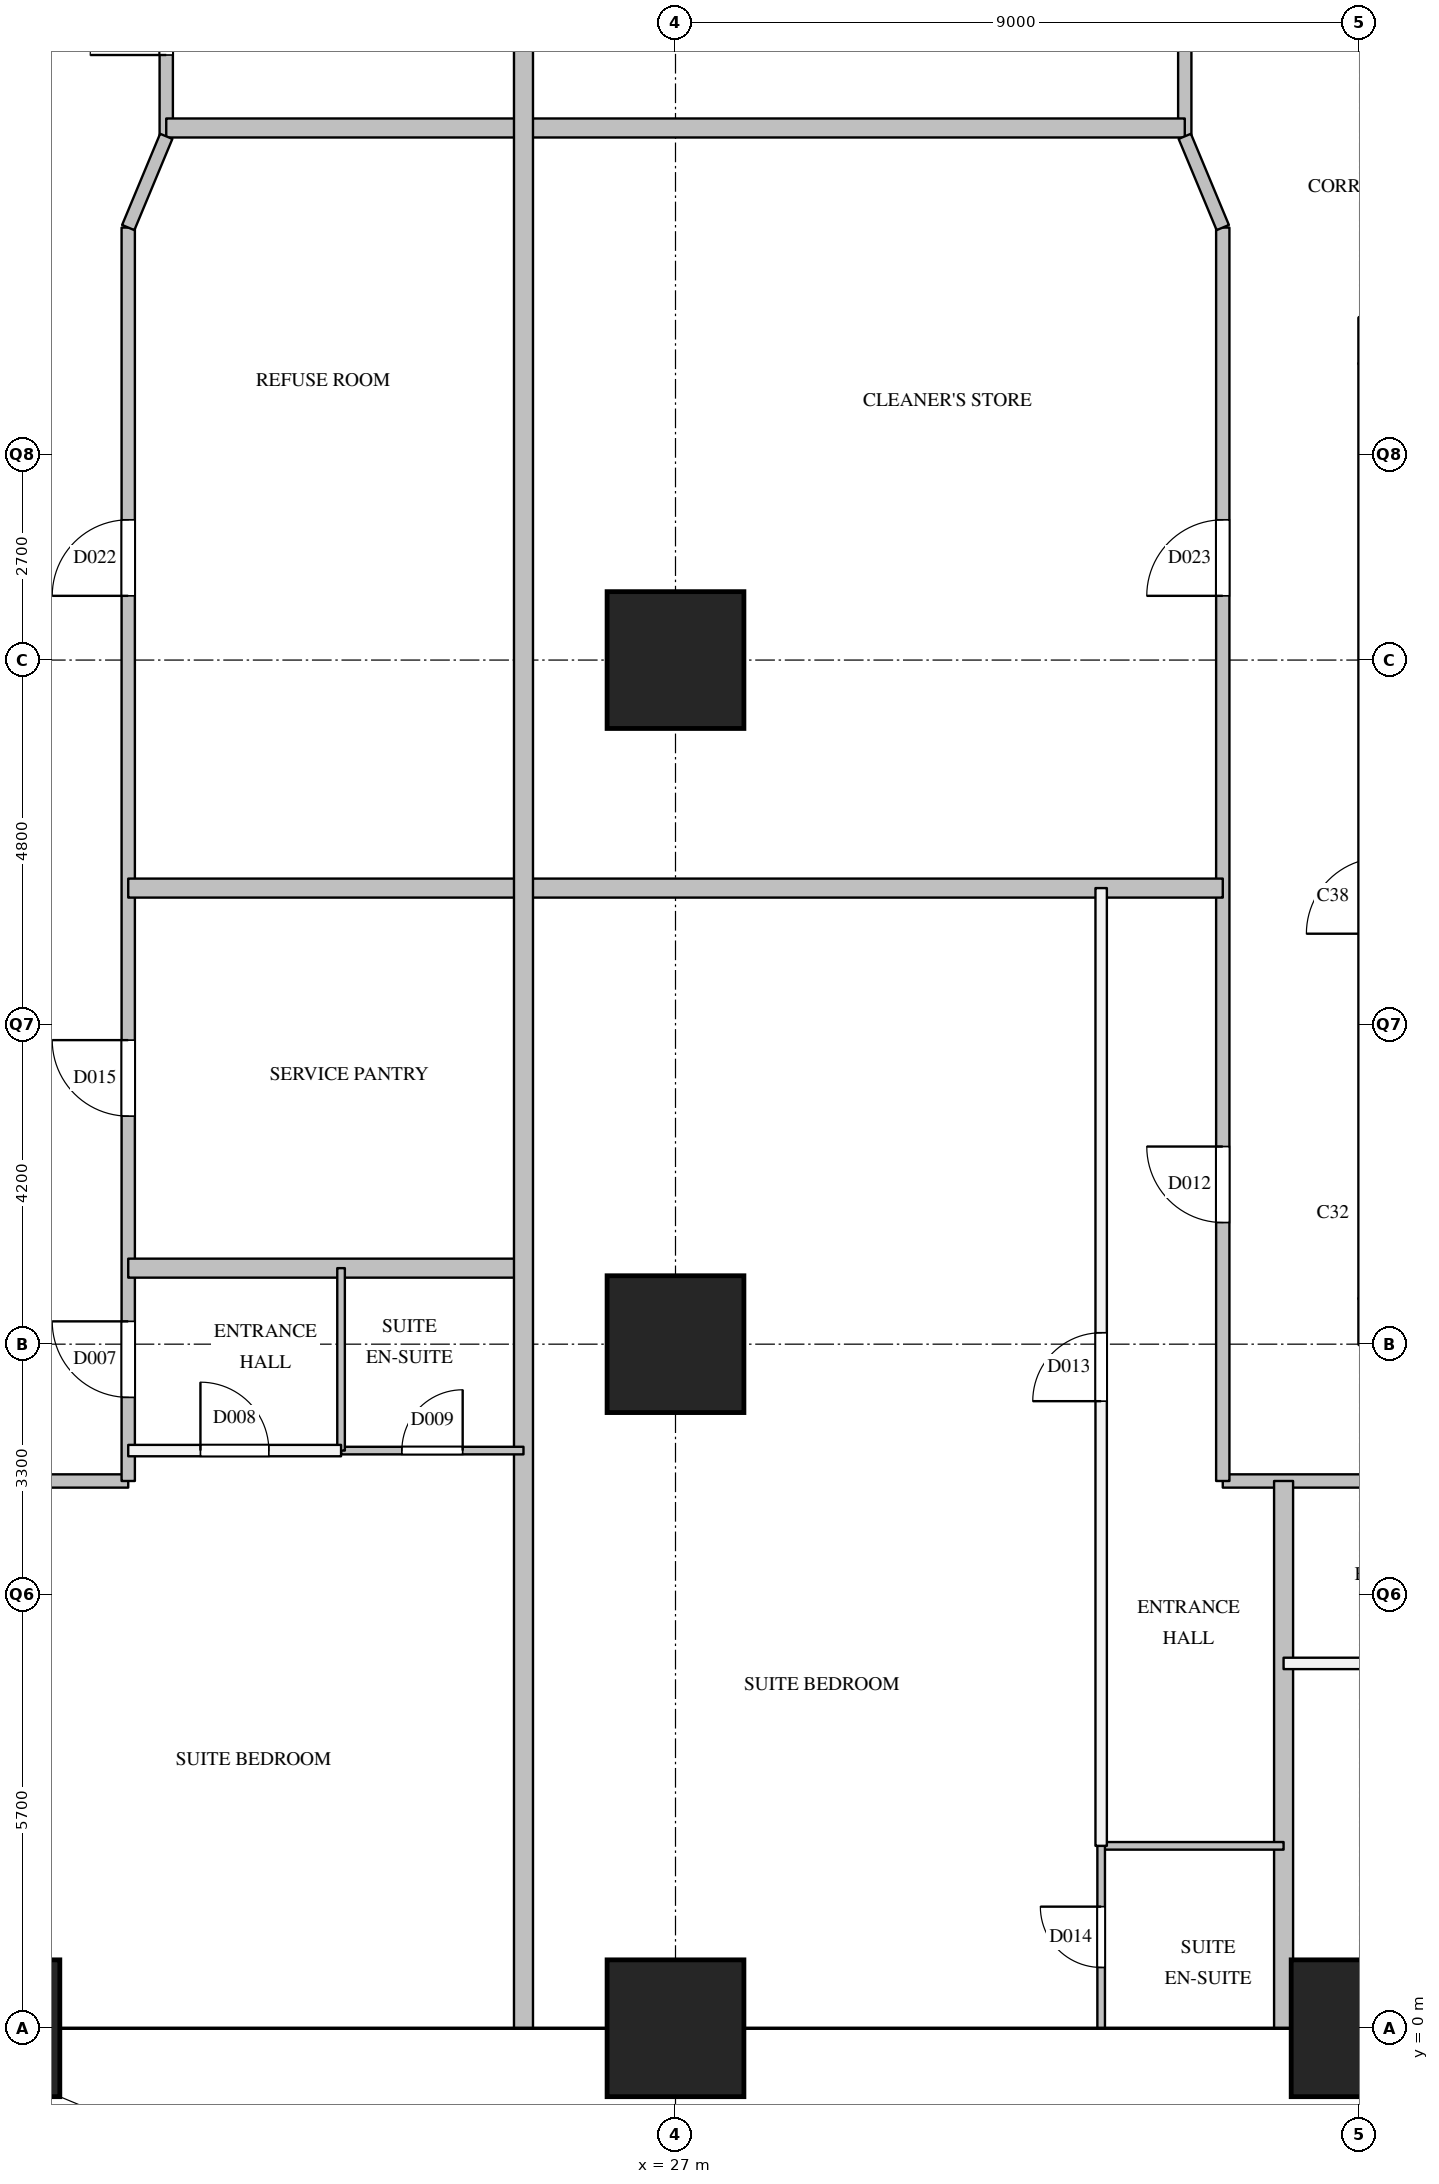
"""IFC4 building model, lengths in metres.
Left out: names, types, materials, properties, quantities, classifications, styles, units other than length and angle.
Written with IfcOpenShell. Run it as: python <this file> out.ifc"""

import sys

from ifc_helpers import new_model, si_unit, direction, frame, frame_2d, origin, origin_2d, place, context, subcontext, project, spatial, rectangle, extrude, element, fill, save


model = new_model("IFC4")
c1 = context("Model", 3, precision=1e-05, world=origin(), true_north=direction((0.0, 1.0)))
c2 = subcontext(c1, "Body", "Model", "MODEL_VIEW")
j1 = project(units=[si_unit("LENGTHUNIT", "METRE"), si_unit("PLANEANGLEUNIT", "RADIAN")], contexts=[c1])
p1 = place(None, origin())
s1 = spatial("IfcSite", under=j1, at=p1, CompositionType="ELEMENT")
p2 = place(p1, origin())
s2 = spatial("IfcBuilding", under=s1, at=p2, CompositionType="ELEMENT")
p3 = place(p2, frame((0.0, 0.0, 72.8)))
s3 = spatial("IfcBuildingStorey", under=s2, at=p3, CompositionType="ELEMENT", Elevation=72.8)
for number, where, z_axis, x_axis in (
    (1, (18.0, 0.0, 0.0), (0.0, 0.0, 1.0), (1.0, 0.0, 0.0)),
    (2, (27.0, 0.0, 0.0), (0.0, 0.0, 1.0), (1.0, 0.0, 0.0)),
    (3, (27.0, 9.0, 0.0), (0.0, 0.0, 1.0), (1.0, 0.0, 0.0)),
    (4, (27.0, 18.0, 0.0), (0.0, 0.0, 1.0), (1.0, 0.0, 0.0)),
    (5, (36.0, 0.0, 0.0), (0.0, 0.0, 1.0), (1.0, 0.0, 0.0)),
):
    element("IfcColumn", number, at=place(p3, frame(where, z_axis=z_axis, x_axis=x_axis)), inside=s3, PredefinedType="COLUMN", context=c2, shape_type="SweptSolid", body=[
        extrude(rectangle(XDim=1.8, YDim=1.8, at=origin_2d()), origin(), (0.0, 0.0, 1.0), 5.0),
    ])
p4 = place(p3, frame((7.2, 7.2, 0.0), z_axis=(0.0, 0.0, 1.0), x_axis=(1.0, 0.0, 0.0)))
e6 = element("IfcWall", 6, at=p4, inside=s3, PredefinedType="PARTITIONING", context=c2, shape_type="SweptSolid", body=[
    extrude(rectangle(XDim=12.6, YDim=0.175, at=frame_2d((6.3, 0.0))), origin(), (0.0, 0.0, 1.0), 4.7),
])
p5 = place(p4, frame((3.6, 0.0, 0.0)))
e7 = element("IfcOpeningElement", 7, at=p5, cuts=e6, PredefinedType="OPENING", context=c2, shape_type="SweptSolid", body=[
    extrude(rectangle(XDim=1.0, YDim=2.1, at=frame_2d((0.5, 1.05))), frame((0.0, 0.097, 0.0), z_axis=(0.0, -1.0, 0.0), x_axis=(1.0, 0.0, 0.0)), (0.0, 0.0, 1.0), 0.195),
])
p6 = place(p4, frame((0.95, 0.0, 0.0)))
e8 = element("IfcOpeningElement", 8, at=p6, cuts=e6, PredefinedType="OPENING", context=c2, shape_type="SweptSolid", body=[
    extrude(rectangle(XDim=0.9, YDim=2.1, at=frame_2d((0.45, 1.05))), frame((0.0, 0.097, 0.0), z_axis=(0.0, -1.0, 0.0), x_axis=(1.0, 0.0, 0.0)), (0.0, 0.0, 1.0), 0.195),
])
p7 = place(p3, frame((34.2, 7.2, 0.0), z_axis=(0.0, 0.0, 1.0), x_axis=(1.0, 0.0, 0.0)))
e9 = element("IfcWall", 9, at=p7, inside=s3, PredefinedType="PARTITIONING", context=c2, shape_type="SweptSolid", body=[
    extrude(rectangle(XDim=12.6, YDim=0.175, at=frame_2d((6.3, 0.0))), origin(), (0.0, 0.0, 1.0), 4.7),
])
p8 = place(p7, frame((4.1, 0.0, 0.0)))
e10 = element("IfcOpeningElement", 10, at=p8, cuts=e9, PredefinedType="OPENING", context=c2, shape_type="SweptSolid", body=[
    extrude(rectangle(XDim=1.0, YDim=2.1, at=frame_2d((0.5, 1.05))), frame((0.0, 0.097, 0.0), z_axis=(0.0, -1.0, 0.0), x_axis=(1.0, 0.0, 0.0)), (0.0, 0.0, 1.0), 0.195),
])
p9 = place(p3, frame((19.8, 7.2, 0.0), z_axis=(0.0, 0.0, 1.0), x_axis=(0.0, 1.0, 0.0)))
e11 = element("IfcWall", 11, at=p9, inside=s3, PredefinedType="PARTITIONING", context=c2, shape_type="SweptSolid", body=[
    extrude(rectangle(XDim=16.49, YDim=0.175, at=frame_2d((8.245, 0.0))), origin(), (0.0, 0.0, 1.0), 4.7),
])
p10 = place(p9, frame((1.1, 0.0, 0.0)))
e12 = element("IfcOpeningElement", 12, at=p10, cuts=e11, PredefinedType="OPENING", context=c2, shape_type="SweptSolid", body=[
    extrude(rectangle(XDim=1.0, YDim=2.1, at=frame_2d((0.5, 1.05))), frame((0.0, 0.097, 0.0), z_axis=(0.0, -1.0, 0.0), x_axis=(1.0, 0.0, 0.0)), (0.0, 0.0, 1.0), 0.195),
])
p11 = place(p9, frame((4.8, 0.0, 0.0)))
e13 = element("IfcOpeningElement", 13, at=p11, cuts=e11, PredefinedType="OPENING", context=c2, shape_type="SweptSolid", body=[
    extrude(rectangle(XDim=1.0, YDim=2.1, at=frame_2d((0.5, 1.05))), frame((0.0, 0.097, 0.0), z_axis=(0.0, -1.0, 0.0), x_axis=(1.0, 0.0, 0.0)), (0.0, 0.0, 1.0), 0.195),
])
p12 = place(p9, frame((11.645, 0.0, 0.0)))
e14 = element("IfcOpeningElement", 14, at=p12, cuts=e11, PredefinedType="OPENING", context=c2, shape_type="SweptSolid", body=[
    extrude(rectangle(XDim=1.0, YDim=2.1, at=frame_2d((0.5, 1.05))), frame((0.0, 0.097, 0.0), z_axis=(0.0, -1.0, 0.0), x_axis=(1.0, 0.0, 0.0)), (0.0, 0.0, 1.0), 0.195),
])
p13 = place(p3, frame((20.3, 24.89, 0.0), z_axis=(0.0, 0.0, 1.0), x_axis=(0.0, 1.0, 0.0)))
e15 = element("IfcWall", 15, at=p13, inside=s3, PredefinedType="PARTITIONING", context=c2, shape_type="SweptSolid", body=[
    extrude(rectangle(XDim=3.03, YDim=0.175, at=frame_2d((1.515, 0.0))), origin(), (0.0, 0.0, 1.0), 3.59),
])
p14 = place(p13, frame((1.07, 0.0, 0.0)))
e16 = element("IfcOpeningElement", 16, at=p14, cuts=e15, PredefinedType="OPENING", context=c2, shape_type="SweptSolid", body=[
    extrude(rectangle(XDim=1.0, YDim=2.1, at=frame_2d((0.5, 1.05))), frame((0.0, 0.097, 0.0), z_axis=(0.0, -1.0, 0.0), x_axis=(1.0, 0.0, 0.0)), (0.0, 0.0, 1.0), 0.195),
])
p15 = place(p3, frame((33.7, 24.89, 0.0), z_axis=(0.0, 0.0, 1.0), x_axis=(0.0, 1.0, 0.0)))
e17 = element("IfcWall", 17, at=p15, inside=s3, PredefinedType="PARTITIONING", context=c2, shape_type="SweptSolid", body=[
    extrude(rectangle(XDim=3.03, YDim=0.175, at=frame_2d((1.515, 0.0))), origin(), (0.0, 0.0, 1.0), 3.7),
])
p16 = place(p3, frame((34.2, 7.2, 0.0), z_axis=(0.0, 0.0, 1.0), x_axis=(0.0, 1.0, 0.0)))
e18 = element("IfcWall", 18, at=p16, inside=s3, PredefinedType="PARTITIONING", context=c2, shape_type="SweptSolid", body=[
    extrude(rectangle(XDim=16.49, YDim=0.175, at=frame_2d((8.245, 0.0))), origin(), (0.0, 0.0, 1.0), 4.7),
])
p17 = place(p16, frame((3.4, 0.0, 0.0)))
e19 = element("IfcOpeningElement", 19, at=p17, cuts=e18, PredefinedType="OPENING", context=c2, shape_type="SweptSolid", body=[
    extrude(rectangle(XDim=1.0, YDim=2.1, at=frame_2d((0.5, 1.05))), frame((0.0, 0.097, 0.0), z_axis=(0.0, -1.0, 0.0), x_axis=(1.0, 0.0, 0.0)), (0.0, 0.0, 1.0), 0.195),
])
p18 = place(p16, frame((11.645, 0.0, 0.0)))
e20 = element("IfcOpeningElement", 20, at=p18, cuts=e18, PredefinedType="OPENING", context=c2, shape_type="SweptSolid", body=[
    extrude(rectangle(XDim=1.0, YDim=2.1, at=frame_2d((0.5, 1.05))), frame((0.0, 0.097, 0.0), z_axis=(0.0, -1.0, 0.0), x_axis=(1.0, 0.0, 0.0)), (0.0, 0.0, 1.0), 0.195),
])
p19 = place(p3, frame((35.0, 4.8, 0.0), z_axis=(0.0, 0.0, 1.0), x_axis=(1.0, 0.0, 0.0)))
e21 = element("IfcWall", 21, at=p19, inside=s3, PredefinedType="PARTITIONING", context=c2, shape_type="SweptSolid", body=[
    extrude(rectangle(XDim=7.6, YDim=0.15, at=frame_2d((3.8, 0.0))), origin(), (0.0, 0.0, 1.0), 4.7),
])
p20 = place(p19, frame((3.35, 0.0, 0.0)))
e22 = element("IfcOpeningElement", 22, at=p20, cuts=e21, PredefinedType="OPENING", context=c2, shape_type="SweptSolid", body=[
    extrude(rectangle(XDim=0.9, YDim=2.1, at=frame_2d((0.45, 1.05))), frame((0.0, 0.085, 0.0), z_axis=(0.0, -1.0, 0.0), x_axis=(1.0, 0.0, 0.0)), (0.0, 0.0, 1.0), 0.17),
])
p21 = place(p3, frame((19.8, 7.6, 0.0), z_axis=(0.0, 0.0, 1.0), x_axis=(1.0, 0.0, 0.0)))
e23 = element("IfcWall", 23, at=p21, inside=s3, PredefinedType="PARTITIONING", context=c2, shape_type="SweptSolid", body=[
    extrude(rectangle(XDim=2.8, YDim=0.15, at=frame_2d((1.4, 0.0))), origin(), (0.0, 0.0, 1.0), 4.7),
])
p22 = place(p21, frame((0.95, 0.0, 0.0)))
e24 = element("IfcOpeningElement", 24, at=p22, cuts=e23, PredefinedType="OPENING", context=c2, shape_type="SweptSolid", body=[
    extrude(rectangle(XDim=0.9, YDim=2.1, at=frame_2d((0.45, 1.05))), frame((0.0, 0.085, 0.0), z_axis=(0.0, -1.0, 0.0), x_axis=(1.0, 0.0, 0.0)), (0.0, 0.0, 1.0), 0.17),
])
p23 = place(p3, frame((32.6, 2.4, 0.0), z_axis=(0.0, 0.0, 1.0), x_axis=(0.0, 1.0, 0.0)))
e25 = element("IfcWall", 25, at=p23, inside=s3, PredefinedType="PARTITIONING", context=c2, shape_type="SweptSolid", body=[
    extrude(rectangle(XDim=12.6, YDim=0.15, at=frame_2d((6.3, 0.0))), origin(), (0.0, 0.0, 1.0), 4.7),
])
p24 = place(p23, frame((5.85, 0.0, 0.0)))
e26 = element("IfcOpeningElement", 26, at=p24, cuts=e25, PredefinedType="OPENING", context=c2, shape_type="SweptSolid", body=[
    extrude(rectangle(XDim=0.9, YDim=2.1, at=frame_2d((0.45, 1.05))), frame((0.0, 0.085, 0.0), z_axis=(0.0, -1.0, 0.0), x_axis=(1.0, 0.0, 0.0)), (0.0, 0.0, 1.0), 0.17),
])
p25 = place(p3, frame((19.8, 10.0, 0.0), z_axis=(0.0, 0.0, 1.0), x_axis=(1.0, 0.0, 0.0)))
e27 = element("IfcWall", 27, at=p25, inside=s3, PredefinedType="PARTITIONING", context=c2, shape_type="SweptSolid", body=[
    extrude(rectangle(XDim=5.2, YDim=0.25, at=frame_2d((2.6, 0.0))), origin(), (0.0, 0.0, 1.0), 4.7),
])
p26 = place(p3, frame((19.8, 15.0, 0.0), z_axis=(0.0, 0.0, 1.0), x_axis=(1.0, 0.0, 0.0)))
e28 = element("IfcWall", 28, at=p26, inside=s3, PredefinedType="PARTITIONING", context=c2, shape_type="SweptSolid", body=[
    extrude(rectangle(XDim=14.4, YDim=0.25, at=frame_2d((7.2, 0.0))), origin(), (0.0, 0.0, 1.0), 3.59),
])
p27 = place(p3, frame((20.3, 25.0, 0.0), z_axis=(0.0, 0.0, 1.0), x_axis=(1.0, 0.0, 0.0)))
e29 = element("IfcWall", 29, at=p27, inside=s3, PredefinedType="PARTITIONING", context=c2, shape_type="SweptSolid", body=[
    extrude(rectangle(XDim=13.4, YDim=0.25, at=frame_2d((6.7, 0.0))), origin(), (0.0, 0.0, 1.0), 3.59),
])
p28 = place(p3, frame((25.0, 0.0, 0.0), z_axis=(0.0, 0.0, 1.0), x_axis=(0.0, 1.0, 0.0)))
e30 = element("IfcWall", 30, at=p28, inside=s3, PredefinedType="PARTITIONING", context=c2, shape_type="SweptSolid", body=[
    extrude(rectangle(XDim=35.0, YDim=0.25, at=frame_2d((17.5, 0.0))), origin(), (0.0, 0.0, 1.0), 3.59),
])
p29 = place(p3, frame((35.0, 0.0, 0.0), z_axis=(0.0, 0.0, 1.0), x_axis=(0.0, 1.0, 0.0)))
e31 = element("IfcWall", 31, at=p29, inside=s3, PredefinedType="PARTITIONING", context=c2, shape_type="SweptSolid", body=[
    extrude(rectangle(XDim=7.2, YDim=0.25, at=frame_2d((3.6, 0.0))), origin(), (0.0, 0.0, 1.0), 3.7),
])
p30 = place(p3, frame((32.6, 2.4, 0.0), z_axis=(0.0, 0.0, 1.0), x_axis=(1.0, 0.0, 0.0)))
e32 = element("IfcWall", 32, at=p30, inside=s3, PredefinedType="PARTITIONING", context=c2, shape_type="SweptSolid", body=[
    extrude(rectangle(XDim=2.4, YDim=0.1, at=frame_2d((1.2, 0.0))), origin(), (0.0, 0.0, 1.0), 4.7),
])
p31 = place(p3, frame((22.6, 7.6, 0.0), z_axis=(0.0, 0.0, 1.0), x_axis=(1.0, 0.0, 0.0)))
e33 = element("IfcWall", 33, at=p31, inside=s3, PredefinedType="PARTITIONING", context=c2, shape_type="SweptSolid", body=[
    extrude(rectangle(XDim=2.4, YDim=0.1, at=frame_2d((1.2, 0.0))), origin(), (0.0, 0.0, 1.0), 4.7),
])
p32 = place(p31, frame((0.8, 0.0, 0.0)))
e34 = element("IfcOpeningElement", 34, at=p32, cuts=e33, PredefinedType="OPENING", context=c2, shape_type="SweptSolid", body=[
    extrude(rectangle(XDim=0.8, YDim=2.1, at=frame_2d((0.4, 1.05))), frame((0.0, 0.06, 0.0), z_axis=(0.0, -1.0, 0.0), x_axis=(1.0, 0.0, 0.0)), (0.0, 0.0, 1.0), 0.12),
])
p33 = place(p3, frame((22.6, 7.6, 0.0), z_axis=(0.0, 0.0, 1.0), x_axis=(0.0, 1.0, 0.0)))
e35 = element("IfcWall", 35, at=p33, inside=s3, PredefinedType="PARTITIONING", context=c2, shape_type="SweptSolid", body=[
    extrude(rectangle(XDim=2.4, YDim=0.1, at=frame_2d((1.2, 0.0))), origin(), (0.0, 0.0, 1.0), 4.7),
])
p34 = place(p3, frame((32.6, 0.0, 0.0), z_axis=(0.0, 0.0, 1.0), x_axis=(0.0, 1.0, 0.0)))
e36 = element("IfcWall", 36, at=p34, inside=s3, PredefinedType="PARTITIONING", context=c2, shape_type="SweptSolid", body=[
    extrude(rectangle(XDim=2.4, YDim=0.1, at=frame_2d((1.2, 0.0))), origin(), (0.0, 0.0, 1.0), 3.7),
])
p35 = place(p34, frame((0.8, 0.0, 0.0)))
e37 = element("IfcOpeningElement", 37, at=p35, cuts=e36, PredefinedType="OPENING", context=c2, shape_type="SweptSolid", body=[
    extrude(rectangle(XDim=0.8, YDim=2.1, at=frame_2d((0.4, 1.05))), frame((0.0, 0.06, 0.0), z_axis=(0.0, -1.0, 0.0), x_axis=(1.0, 0.0, 0.0)), (0.0, 0.0, 1.0), 0.12),
])
for number, where, z_axis, x_axis in (
    (38, (34.2, 23.69, 0.0), (0.0, 0.0, 1.0), (-0.385, 0.923, 0.0)),
    (39, (20.3, 24.89, 0.0), (0.0, 0.0, 1.0), (-0.385, -0.923, 0.0)),
):
    element("IfcWall", number, at=place(p3, frame(where, z_axis=z_axis, x_axis=x_axis)), inside=s3, PredefinedType="PARTITIONING", context=c2, shape_type="SweptSolid", body=[
        extrude(rectangle(XDim=1.3, YDim=0.175, at=frame_2d((0.65, 0.0))), origin(), (0.0, 0.0, 1.0), 4.7),
    ])
p36 = place(p10, origin())
e40 = element("IfcDoor", 40, at=p36, inside=s3, OperationType="SINGLE_SWING_RIGHT", PredefinedType="DOOR", context=c2, shape_type="SweptSolid", body=[
    extrude(rectangle(XDim=1.0, YDim=2.1, at=frame_2d((0.5, 1.05))), frame((0.0, 0.025, 0.0), z_axis=(0.0, -1.0, 0.0), x_axis=(1.0, 0.0, 0.0)), (0.0, 0.0, 1.0), 0.05),
])
fill(e12, e40)
p37 = place(p22, origin())
e41 = element("IfcDoor", 41, at=p37, inside=s3, OperationType="SINGLE_SWING_LEFT", PredefinedType="DOOR", context=c2, shape_type="SweptSolid", body=[
    extrude(rectangle(XDim=0.9, YDim=2.1, at=frame_2d((0.45, 1.05))), frame((0.0, 0.025, 0.0), z_axis=(0.0, -1.0, 0.0), x_axis=(1.0, 0.0, 0.0)), (0.0, 0.0, 1.0), 0.05),
])
fill(e24, e41)
p38 = place(p32, origin())
e42 = element("IfcDoor", 42, at=p38, inside=s3, OperationType="SINGLE_SWING_RIGHT", PredefinedType="DOOR", context=c2, shape_type="SweptSolid", body=[
    extrude(rectangle(XDim=0.8, YDim=2.1, at=frame_2d((0.4, 1.05))), frame((0.0, 0.025, 0.0), z_axis=(0.0, -1.0, 0.0), x_axis=(1.0, 0.0, 0.0)), (0.0, 0.0, 1.0), 0.05),
])
fill(e34, e42)
p39 = place(p17, origin())
e43 = element("IfcDoor", 43, at=p39, inside=s3, OperationType="SINGLE_SWING_RIGHT", PredefinedType="DOOR", context=c2, shape_type="SweptSolid", body=[
    extrude(rectangle(XDim=1.0, YDim=2.1, at=frame_2d((0.5, 1.05))), frame((0.0, 0.025, 0.0), z_axis=(0.0, -1.0, 0.0), x_axis=(1.0, 0.0, 0.0)), (0.0, 0.0, 1.0), 0.05),
])
fill(e19, e43)
p40 = place(p24, origin())
e44 = element("IfcDoor", 44, at=p40, inside=s3, OperationType="SINGLE_SWING_LEFT", PredefinedType="DOOR", context=c2, shape_type="SweptSolid", body=[
    extrude(rectangle(XDim=0.9, YDim=2.1, at=frame_2d((0.45, 1.05))), frame((0.0, 0.025, 0.0), z_axis=(0.0, -1.0, 0.0), x_axis=(1.0, 0.0, 0.0)), (0.0, 0.0, 1.0), 0.05),
])
fill(e26, e44)
p41 = place(p35, origin())
e45 = element("IfcDoor", 45, at=p41, inside=s3, OperationType="SINGLE_SWING_RIGHT", PredefinedType="DOOR", context=c2, shape_type="SweptSolid", body=[
    extrude(rectangle(XDim=0.8, YDim=2.1, at=frame_2d((0.4, 1.05))), frame((0.0, 0.025, 0.0), z_axis=(0.0, -1.0, 0.0), x_axis=(1.0, 0.0, 0.0)), (0.0, 0.0, 1.0), 0.05),
])
fill(e37, e45)
p42 = place(p11, origin())
e46 = element("IfcDoor", 46, at=p42, inside=s3, OperationType="SINGLE_SWING_RIGHT", PredefinedType="DOOR", context=c2, shape_type="SweptSolid", body=[
    extrude(rectangle(XDim=1.0, YDim=2.1, at=frame_2d((0.5, 1.05))), frame((0.0, 0.025, 0.0), z_axis=(0.0, -1.0, 0.0), x_axis=(1.0, 0.0, 0.0)), (0.0, 0.0, 1.0), 0.05),
])
fill(e13, e46)
p43 = place(p12, origin())
e47 = element("IfcDoor", 47, at=p43, inside=s3, OperationType="SINGLE_SWING_LEFT", PredefinedType="DOOR", context=c2, shape_type="SweptSolid", body=[
    extrude(rectangle(XDim=1.0, YDim=2.1, at=frame_2d((0.5, 1.05))), frame((0.0, 0.025, 0.0), z_axis=(0.0, -1.0, 0.0), x_axis=(1.0, 0.0, 0.0)), (0.0, 0.0, 1.0), 0.05),
])
fill(e14, e47)
p44 = place(p18, origin())
e48 = element("IfcDoor", 48, at=p44, inside=s3, OperationType="SINGLE_SWING_LEFT", PredefinedType="DOOR", context=c2, shape_type="SweptSolid", body=[
    extrude(rectangle(XDim=1.0, YDim=2.1, at=frame_2d((0.5, 1.05))), frame((0.0, 0.025, 0.0), z_axis=(0.0, -1.0, 0.0), x_axis=(1.0, 0.0, 0.0)), (0.0, 0.0, 1.0), 0.05),
])
fill(e20, e48)
p45 = place(p14, origin())
e49 = element("IfcDoor", 49, at=p45, inside=s3, OperationType="SINGLE_SWING_LEFT", PredefinedType="DOOR", context=c2, shape_type="SweptSolid", body=[
    extrude(rectangle(XDim=1.0, YDim=2.1, at=frame_2d((0.5, 1.05))), frame((0.0, 0.025, 0.0), z_axis=(0.0, -1.0, 0.0), x_axis=(1.0, 0.0, 0.0)), (0.0, 0.0, 1.0), 0.05),
])
fill(e16, e49)
save(model, sys.argv[1])
